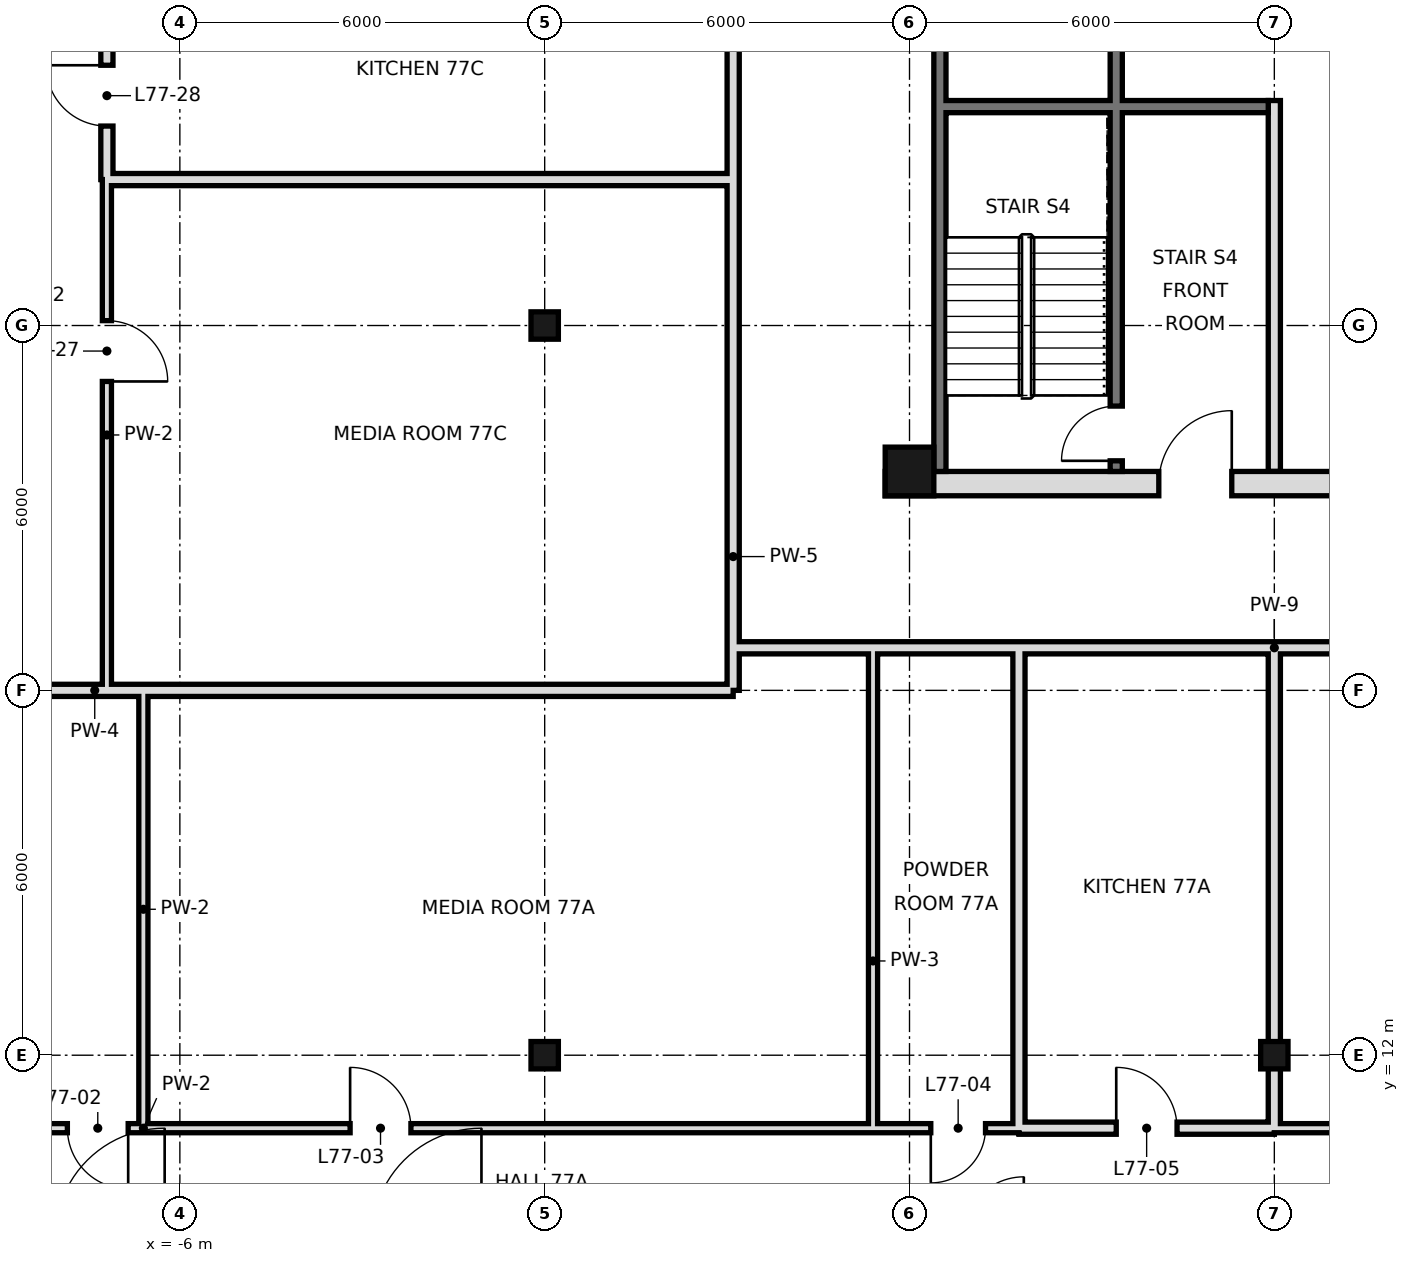
"""IFC4 building model, lengths in metres.
Left out: names, types, materials, properties, quantities, classifications, styles, units other than length and angle.
Written with IfcOpenShell. Run it as: python <this file> out.ifc"""

import sys

from ifc_helpers import new_model, si_unit, direction, frame, frame_2d, origin, origin_2d, place, context, subcontext, project, spatial, rectangle, hollow_rectangle, extrude, element, fill, save


model = new_model("IFC4")
c1 = context("Model", 3, precision=1e-05, world=origin(), true_north=direction((0.0, 1.0)))
c2 = subcontext(c1, "Body", "Model", "MODEL_VIEW")
j1 = project(units=[si_unit("LENGTHUNIT", "METRE"), si_unit("PLANEANGLEUNIT", "RADIAN")], contexts=[c1])
p1 = place(None, origin())
s1 = spatial("IfcSite", under=j1, at=p1, CompositionType="ELEMENT")
p2 = place(p1, origin())
s2 = spatial("IfcBuilding", under=s1, at=p2, CompositionType="ELEMENT")
p3 = place(p2, frame((0.0, 0.0, 323.2)))
s3 = spatial("IfcBuildingStorey", under=s2, at=p3, CompositionType="ELEMENT", Elevation=323.2)
for number, where, z_axis, x_axis in (
    (1, (0.0, 12.0, 0.0), (0.0, 0.0, 1.0), (1.0, 0.0, 0.0)),
    (2, (0.0, 24.0, 0.0), (0.0, 0.0, 1.0), (1.0, 0.0, 0.0)),
):
    element("IfcColumn", number, at=place(p3, frame(where, z_axis=z_axis, x_axis=x_axis)), inside=s3, PredefinedType="COLUMN", context=c2, shape_type="SweptSolid", body=[
        extrude(hollow_rectangle(XDim=0.45, YDim=0.45, WallThickness=0.022, at=origin_2d()), origin(), (0.0, 0.0, 1.0), 3.6),
    ])
p4 = place(p3, frame((6.0, 21.6, 0.0), z_axis=(0.0, 0.0, 1.0), x_axis=(1.0, 0.0, 0.0)))
e3 = element("IfcColumn", 3, at=p4, inside=s3, PredefinedType="COLUMN", context=c2, shape_type="SweptSolid", body=[
    extrude(hollow_rectangle(XDim=0.8, YDim=0.8, WallThickness=0.025, at=origin_2d()), origin(), (0.0, 0.0, 1.0), 3.6),
])
p5 = place(p3, frame((12.0, 12.0, 0.0), z_axis=(0.0, 0.0, 1.0), x_axis=(1.0, 0.0, 0.0)))
e4 = element("IfcColumn", 4, at=p5, inside=s3, PredefinedType="COLUMN", context=c2, shape_type="SweptSolid", body=[
    extrude(hollow_rectangle(XDim=0.45, YDim=0.45, WallThickness=0.022, at=origin_2d()), origin(), (0.0, 0.0, 1.0), 3.6),
])
p6 = place(p3, frame((-6.6, 10.8, 0.0), z_axis=(0.0, 0.0, 1.0), x_axis=(0.0, 1.0, 0.0)))
e5 = element("IfcWall", 5, at=p6, inside=s3, PredefinedType="PARTITIONING", context=c2, shape_type="SweptSolid", body=[
    extrude(rectangle(XDim=7.2, YDim=0.15, at=frame_2d((3.6, 0.0))), origin(), (0.0, 0.0, 1.0), 3.42),
])
p7 = place(p3, frame((-7.2, 26.4, 0.0), z_axis=(0.0, 0.0, 1.0), x_axis=(0.0, 1.0, 0.0)))
e6 = element("IfcWall", 6, at=p7, inside=s3, PredefinedType="SOLIDWALL", context=c2, shape_type="SweptSolid", body=[
    extrude(rectangle(XDim=3.6, YDim=0.2, at=frame_2d((1.8, 0.0))), origin(), (0.0, 0.0, 1.0), 2.72),
])
p8 = place(p7, frame((0.88, 0.0, 0.0)))
e7 = element("IfcOpeningElement", 7, at=p8, cuts=e6, PredefinedType="OPENING", context=c2, shape_type="SweptSolid", body=[
    extrude(rectangle(XDim=1.0, YDim=2.4, at=frame_2d((0.5, 1.2))), frame((0.0, 0.11, 0.0), z_axis=(0.0, -1.0, 0.0), x_axis=(1.0, 0.0, 0.0)), (0.0, 0.0, 1.0), 0.22),
])
p9 = place(p3, frame((-7.2, 18.0, 0.0), z_axis=(0.0, 0.0, 1.0), x_axis=(0.0, 1.0, 0.0)))
e8 = element("IfcWall", 8, at=p9, inside=s3, PredefinedType="PARTITIONING", context=c2, shape_type="SweptSolid", body=[
    extrude(rectangle(XDim=8.4, YDim=0.15, at=frame_2d((4.2, 0.0))), origin(), (0.0, 0.0, 1.0), 3.42),
])
p10 = place(p9, frame((5.08, 0.0, 0.0)))
e9 = element("IfcOpeningElement", 9, at=p10, cuts=e8, PredefinedType="OPENING", context=c2, shape_type="SweptSolid", body=[
    extrude(rectangle(XDim=1.0, YDim=2.4, at=frame_2d((0.5, 1.2))), frame((0.0, 0.085, 0.0), z_axis=(0.0, -1.0, 0.0), x_axis=(1.0, 0.0, 0.0)), (0.0, 0.0, 1.0), 0.17),
])
p11 = place(p3, frame((12.0, 10.8, 0.0), z_axis=(0.0, 0.0, 1.0), x_axis=(0.0, 1.0, 0.0)))
e10 = element("IfcWall", 10, at=p11, inside=s3, PredefinedType="SOLIDWALL", context=c2, shape_type="SweptSolid", body=[
    extrude(rectangle(XDim=7.9, YDim=0.2, at=frame_2d((3.95, 0.0))), origin(), (0.0, 0.0, 1.0), 2.72),
])
p12 = place(p3, frame((3.1, 18.7, 0.0), z_axis=(0.0, 0.0, 1.0), x_axis=(0.0, 1.0, 0.0)))
e11 = element("IfcWall", 11, at=p12, inside=s3, PredefinedType="SOLIDWALL", context=c2, shape_type="SweptSolid", body=[
    extrude(rectangle(XDim=7.7, YDim=0.2, at=frame_2d((3.85, 0.0))), origin(), (0.0, 0.0, 1.0), 3.42),
])
p13 = place(p3, frame((3.1, 26.4, 0.0), z_axis=(0.0, 0.0, 1.0), x_axis=(0.0, 1.0, 0.0)))
e12 = element("IfcWall", 12, at=p13, inside=s3, PredefinedType="SOLIDWALL", context=c2, shape_type="SweptSolid", body=[
    extrude(rectangle(XDim=3.6, YDim=0.2, at=frame_2d((1.8, 0.0))), origin(), (0.0, 0.0, 1.0), 2.97),
])
p14 = place(p3, frame((3.1, 18.0, 0.0), z_axis=(0.0, 0.0, 1.0), x_axis=(0.0, 1.0, 0.0)))
e13 = element("IfcWall", 13, at=p14, inside=s3, PredefinedType="SOLIDWALL", context=c2, shape_type="SweptSolid", body=[
    extrude(rectangle(XDim=0.7, YDim=0.2, at=frame_2d((0.35, 0.0))), origin(), (0.0, 0.0, 1.0), 2.97),
])
p15 = place(p3, frame((5.4, 10.8, 0.0), z_axis=(0.0, 0.0, 1.0), x_axis=(0.0, 1.0, 0.0)))
e14 = element("IfcWall", 14, at=p15, inside=s3, PredefinedType="PARTITIONING", context=c2, shape_type="SweptSolid", body=[
    extrude(rectangle(XDim=7.9, YDim=0.15, at=frame_2d((3.95, 0.0))), origin(), (0.0, 0.0, 1.0), 3.42),
])
p16 = place(p3, frame((7.8, 10.8, 0.0), z_axis=(0.0, 0.0, 1.0), x_axis=(0.0, 1.0, 0.0)))
e15 = element("IfcWall", 15, at=p16, inside=s3, PredefinedType="SOLIDWALL", context=c2, shape_type="SweptSolid", body=[
    extrude(rectangle(XDim=7.9, YDim=0.2, at=frame_2d((3.95, 0.0))), origin(), (0.0, 0.0, 1.0), 2.72),
])
p17 = place(p3, frame((7.8, 10.8, 0.0), z_axis=(0.0, 0.0, 1.0), x_axis=(1.0, 0.0, 0.0)))
e16 = element("IfcWall", 16, at=p17, inside=s3, PredefinedType="SOLIDWALL", context=c2, shape_type="SweptSolid", body=[
    extrude(rectangle(XDim=4.2, YDim=0.2, at=frame_2d((2.1, 0.0))), origin(), (0.0, 0.0, 1.0), 2.72),
])
p18 = place(p17, frame((1.6, 0.0, 0.0)))
e17 = element("IfcOpeningElement", 17, at=p18, cuts=e16, PredefinedType="OPENING", context=c2, shape_type="SweptSolid", body=[
    extrude(rectangle(XDim=1.0, YDim=2.4, at=frame_2d((0.5, 1.2))), frame((0.0, 0.11, 0.0), z_axis=(0.0, -1.0, 0.0), x_axis=(1.0, 0.0, 0.0)), (0.0, 0.0, 1.0), 0.22),
])
p19 = place(p3, frame((-18.6, 10.8, 0.0), z_axis=(0.0, 0.0, 1.0), x_axis=(1.0, 0.0, 0.0)))
e18 = element("IfcWall", 18, at=p19, inside=s3, PredefinedType="PARTITIONING", context=c2, shape_type="SweptSolid", body=[
    extrude(rectangle(XDim=24.0, YDim=0.15, at=frame_2d((12.0, 0.0))), origin(), (0.0, 0.0, 1.0), 3.42),
])
p20 = place(p19, frame((10.75, 0.0, 0.0)))
e19 = element("IfcOpeningElement", 19, at=p20, cuts=e18, PredefinedType="OPENING", context=c2, shape_type="SweptSolid", body=[
    extrude(rectangle(XDim=1.0, YDim=2.4, at=frame_2d((0.5, 1.2))), frame((0.0, 0.085, 0.0), z_axis=(0.0, -1.0, 0.0), x_axis=(1.0, 0.0, 0.0)), (0.0, 0.0, 1.0), 0.17),
])
p21 = place(p19, frame((15.4, 0.0, 0.0)))
e20 = element("IfcOpeningElement", 20, at=p21, cuts=e18, PredefinedType="OPENING", context=c2, shape_type="SweptSolid", body=[
    extrude(rectangle(XDim=1.0, YDim=2.4, at=frame_2d((0.5, 1.2))), frame((0.0, 0.085, 0.0), z_axis=(0.0, -1.0, 0.0), x_axis=(1.0, 0.0, 0.0)), (0.0, 0.0, 1.0), 0.17),
])
p22 = place(p3, frame((12.0, 10.8, 0.0), z_axis=(0.0, 0.0, 1.0), x_axis=(1.0, 0.0, 0.0)))
e21 = element("IfcWall", 21, at=p22, inside=s3, PredefinedType="PARTITIONING", context=c2, shape_type="SweptSolid", body=[
    extrude(rectangle(XDim=12.6, YDim=0.15, at=frame_2d((6.3, 0.0))), origin(), (0.0, 0.0, 1.0), 3.42),
])
p23 = place(p22, frame((2.5, 0.0, 0.0)))
e22 = element("IfcOpeningElement", 22, at=p23, cuts=e21, PredefinedType="OPENING", context=c2, shape_type="SweptSolid", body=[
    extrude(rectangle(XDim=1.0, YDim=2.4, at=frame_2d((0.5, 1.2))), frame((0.0, 0.085, 0.0), z_axis=(0.0, -1.0, 0.0), x_axis=(1.0, 0.0, 0.0)), (0.0, 0.0, 1.0), 0.17),
])
p24 = place(p22, frame((9.82, 0.0, 0.0)))
e23 = element("IfcOpeningElement", 23, at=p24, cuts=e21, PredefinedType="OPENING", context=c2, shape_type="SweptSolid", body=[
    extrude(rectangle(XDim=1.0, YDim=2.4, at=frame_2d((0.5, 1.2))), frame((0.0, 0.085, 0.0), z_axis=(0.0, -1.0, 0.0), x_axis=(1.0, 0.0, 0.0)), (0.0, 0.0, 1.0), 0.17),
])
p25 = place(p3, frame((5.4, 10.8, 0.0), z_axis=(0.0, 0.0, 1.0), x_axis=(1.0, 0.0, 0.0)))
e24 = element("IfcWall", 24, at=p25, inside=s3, PredefinedType="PARTITIONING", context=c2, shape_type="SweptSolid", body=[
    extrude(rectangle(XDim=2.4, YDim=0.15, at=frame_2d((1.2, 0.0))), origin(), (0.0, 0.0, 1.0), 3.42),
])
p26 = place(p25, frame((0.95, 0.0, 0.0)))
e25 = element("IfcOpeningElement", 25, at=p26, cuts=e24, PredefinedType="OPENING", context=c2, shape_type="SweptSolid", body=[
    extrude(rectangle(XDim=0.9, YDim=2.4, at=frame_2d((0.45, 1.2))), frame((0.0, 0.085, 0.0), z_axis=(0.0, -1.0, 0.0), x_axis=(1.0, 0.0, 0.0)), (0.0, 0.0, 1.0), 0.17),
])
p27 = place(p3, frame((-18.6, 18.0, 0.0), z_axis=(0.0, 0.0, 1.0), x_axis=(1.0, 0.0, 0.0)))
e26 = element("IfcWall", 26, at=p27, inside=s3, PredefinedType="SOLIDWALL", context=c2, shape_type="SweptSolid", body=[
    extrude(rectangle(XDim=21.7, YDim=0.2, at=frame_2d((10.85, 0.0))), origin(), (0.0, 0.0, 1.0), 2.72),
])
p28 = place(p3, frame((3.1, 18.7, 0.0), z_axis=(0.0, 0.0, 1.0), x_axis=(1.0, 0.0, 0.0)))
e27 = element("IfcWall", 27, at=p28, inside=s3, PredefinedType="SOLIDWALL", context=c2, shape_type="SweptSolid", body=[
    extrude(rectangle(XDim=4.7, YDim=0.2, at=frame_2d((2.35, 0.0))), origin(), (0.0, 0.0, 1.0), 2.72),
])
p29 = place(p3, frame((12.0, 18.7, 0.0), z_axis=(0.0, 0.0, 1.0), x_axis=(1.0, 0.0, 0.0)))
e28 = element("IfcWall", 28, at=p29, inside=s3, PredefinedType="SOLIDWALL", context=c2, shape_type="SweptSolid", body=[
    extrude(rectangle(XDim=15.0, YDim=0.2, at=frame_2d((7.5, 0.0))), origin(), (0.0, 0.0, 1.0), 2.72),
])
p30 = place(p29, frame((3.26, 0.0, 0.0)))
e29 = element("IfcOpeningElement", 29, at=p30, cuts=e28, PredefinedType="OPENING", context=c2, shape_type="SweptSolid", body=[
    extrude(rectangle(XDim=1.2, YDim=2.4, at=frame_2d((0.6, 1.2))), frame((0.0, 0.11, 0.0), z_axis=(0.0, -1.0, 0.0), x_axis=(1.0, 0.0, 0.0)), (0.0, 0.0, 1.0), 0.22),
])
p31 = place(p3, frame((7.8, 18.7, 0.0), z_axis=(0.0, 0.0, 1.0), x_axis=(1.0, 0.0, 0.0)))
e30 = element("IfcWall", 30, at=p31, inside=s3, PredefinedType="SOLIDWALL", context=c2, shape_type="SweptSolid", body=[
    extrude(rectangle(XDim=4.2, YDim=0.2, at=frame_2d((2.1, 0.0))), origin(), (0.0, 0.0, 1.0), 3.42),
])
p32 = place(p3, frame((-7.2, 26.4, 0.0), z_axis=(0.0, 0.0, 1.0), x_axis=(1.0, 0.0, 0.0)))
e31 = element("IfcWall", 31, at=p32, inside=s3, PredefinedType="SOLIDWALL", context=c2, shape_type="SweptSolid", body=[
    extrude(rectangle(XDim=10.3, YDim=0.2, at=frame_2d((5.15, 0.0))), origin(), (0.0, 0.0, 1.0), 2.72),
])
p33 = place(p3, frame((6.5, 21.6, 0.0), z_axis=(0.0, 0.0, 1.0), x_axis=(0.0, 1.0, 0.0)))
e32 = element("IfcWall", 32, at=p33, inside=s3, PredefinedType="SOLIDWALL", context=c2, shape_type="SweptSolid", body=[
    extrude(rectangle(XDim=23.5, YDim=0.2, at=frame_2d((11.75, 0.0))), origin(), (0.0, 0.0, 1.0), 3.42),
])
p34 = place(p3, frame((5.6, 21.4, 0.0), z_axis=(0.0, 0.0, 1.0), x_axis=(1.0, 0.0, 0.0)))
e33 = element("IfcWall", 33, at=p34, inside=s3, PredefinedType="SOLIDWALL", context=c2, shape_type="SweptSolid", body=[
    extrude(rectangle(XDim=36.8, YDim=0.4, at=frame_2d((18.4, 0.0))), origin(), (0.0, 0.0, 1.0), 3.42),
])
p35 = place(p34, frame((8.5, 0.0, 0.0)))
e34 = element("IfcOpeningElement", 34, at=p35, cuts=e33, PredefinedType="OPENING", context=c2, shape_type="SweptSolid", body=[
    extrude(rectangle(XDim=1.8, YDim=2.1, at=frame_2d((0.9, 1.05))), frame((0.0, 0.21, 0.0), z_axis=(0.0, -1.0, 0.0), x_axis=(1.0, 0.0, 0.0)), (0.0, 0.0, 1.0), 0.42),
])
p36 = place(p34, frame((17.5, 0.0, 0.0)))
e35 = element("IfcOpeningElement", 35, at=p36, cuts=e33, PredefinedType="OPENING", context=c2, shape_type="SweptSolid", body=[
    extrude(rectangle(XDim=1.8, YDim=2.1, at=frame_2d((0.9, 1.05))), frame((0.0, 0.21, 0.0), z_axis=(0.0, -1.0, 0.0), x_axis=(1.0, 0.0, 0.0)), (0.0, 0.0, 1.0), 0.42),
])
p37 = place(p34, frame((26.5, 0.0, 0.0)))
e36 = element("IfcOpeningElement", 36, at=p37, cuts=e33, PredefinedType="OPENING", context=c2, shape_type="SweptSolid", body=[
    extrude(rectangle(XDim=1.8, YDim=2.1, at=frame_2d((0.9, 1.05))), frame((0.0, 0.21, 0.0), z_axis=(0.0, -1.0, 0.0), x_axis=(1.0, 0.0, 0.0)), (0.0, 0.0, 1.0), 0.42),
])
p38 = place(p34, frame((4.5, 0.0, 0.0)))
e37 = element("IfcOpeningElement", 37, at=p38, cuts=e33, PredefinedType="OPENING", context=c2, shape_type="SweptSolid", body=[
    extrude(rectangle(XDim=1.2, YDim=2.1, at=frame_2d((0.6, 1.05))), frame((0.0, 0.21, 0.0), z_axis=(0.0, -1.0, 0.0), x_axis=(1.0, 0.0, 0.0)), (0.0, 0.0, 1.0), 0.42),
])
p39 = place(p34, frame((31.1, 0.0, 0.0)))
e38 = element("IfcOpeningElement", 38, at=p39, cuts=e33, PredefinedType="OPENING", context=c2, shape_type="SweptSolid", body=[
    extrude(rectangle(XDim=1.2, YDim=2.1, at=frame_2d((0.6, 1.05))), frame((0.0, 0.21, 0.0), z_axis=(0.0, -1.0, 0.0), x_axis=(1.0, 0.0, 0.0)), (0.0, 0.0, 1.0), 0.42),
])
p40 = place(p3, frame((12.0, 21.6, 0.0), z_axis=(0.0, 0.0, 1.0), x_axis=(0.0, 1.0, 0.0)))
e39 = element("IfcWall", 39, at=p40, inside=s3, PredefinedType="PARTITIONING", context=c2, shape_type="SweptSolid", body=[
    extrude(rectangle(XDim=6.1, YDim=0.2, at=frame_2d((3.05, 0.0))), origin(), (0.0, 0.0, 1.0), 3.42),
])
p41 = place(p3, frame((9.4, 21.6, 0.0), z_axis=(0.0, 0.0, 1.0), x_axis=(0.0, 1.0, 0.0)))
e40 = element("IfcWall", 40, at=p41, inside=s3, PredefinedType="SOLIDWALL", context=c2, shape_type="SweptSolid", body=[
    extrude(rectangle(XDim=23.4, YDim=0.2, at=frame_2d((11.7, 0.0))), origin(), (0.0, 0.0, 1.0), 3.42),
])
p42 = place(p41, frame((7.95, 0.0, 0.0)))
e41 = element("IfcOpeningElement", 41, at=p42, cuts=e40, PredefinedType="OPENING", context=c2, shape_type="SweptSolid", body=[
    extrude(rectangle(XDim=1.0, YDim=2.1, at=frame_2d((0.5, 1.05))), frame((0.0, 0.11, 0.0), z_axis=(0.0, -1.0, 0.0), x_axis=(1.0, 0.0, 0.0)), (0.0, 0.0, 1.0), 0.22),
])
p43 = place(p41, frame((12.6, 0.0, 0.0)))
e42 = element("IfcOpeningElement", 42, at=p43, cuts=e40, PredefinedType="OPENING", context=c2, shape_type="SweptSolid", body=[
    extrude(rectangle(XDim=1.0, YDim=2.1, at=frame_2d((0.5, 1.05))), frame((0.0, 0.11, 0.0), z_axis=(0.0, -1.0, 0.0), x_axis=(1.0, 0.0, 0.0)), (0.0, 0.0, 1.0), 0.22),
])
p44 = place(p41, frame((22.1, 0.0, 0.0)))
e43 = element("IfcOpeningElement", 43, at=p44, cuts=e40, PredefinedType="OPENING", context=c2, shape_type="SweptSolid", body=[
    extrude(rectangle(XDim=1.0, YDim=2.1, at=frame_2d((0.5, 1.05))), frame((0.0, 0.11, 0.0), z_axis=(0.0, -1.0, 0.0), x_axis=(1.0, 0.0, 0.0)), (0.0, 0.0, 1.0), 0.22),
])
p45 = place(p41, frame((0.175, 0.0, 0.0)))
e44 = element("IfcOpeningElement", 44, at=p45, cuts=e40, PredefinedType="OPENING", context=c2, shape_type="SweptSolid", body=[
    extrude(rectangle(XDim=0.9, YDim=2.1, at=frame_2d((0.45, 1.05))), frame((0.0, 0.11, 0.0), z_axis=(0.0, -1.0, 0.0), x_axis=(1.0, 0.0, 0.0)), (0.0, 0.0, 1.0), 0.22),
])
p46 = place(p3, frame((6.6, 27.6, 0.0), z_axis=(0.0, 0.0, 1.0), x_axis=(1.0, 0.0, 0.0)))
e45 = element("IfcWall", 45, at=p46, inside=s3, PredefinedType="SOLIDWALL", context=c2, shape_type="SweptSolid", body=[
    extrude(rectangle(XDim=5.3, YDim=0.2, at=frame_2d((2.65, 0.0))), origin(), (0.0, 0.0, 1.0), 3.42),
])
p47 = place(p20, origin())
e46 = element("IfcDoor", 46, at=p47, inside=s3, OperationType="SINGLE_SWING_RIGHT", PredefinedType="DOOR", context=c2, shape_type="SweptSolid", body=[
    extrude(rectangle(XDim=1.0, YDim=2.4, at=frame_2d((0.5, 1.2))), frame((0.0, 0.025, 0.0), z_axis=(0.0, -1.0, 0.0), x_axis=(1.0, 0.0, 0.0)), (0.0, 0.0, 1.0), 0.05),
])
fill(e19, e46)
p48 = place(p21, origin())
e47 = element("IfcDoor", 47, at=p48, inside=s3, OperationType="SINGLE_SWING_LEFT", PredefinedType="DOOR", context=c2, shape_type="SweptSolid", body=[
    extrude(rectangle(XDim=1.0, YDim=2.4, at=frame_2d((0.5, 1.2))), frame((0.0, 0.025, 0.0), z_axis=(0.0, -1.0, 0.0), x_axis=(1.0, 0.0, 0.0)), (0.0, 0.0, 1.0), 0.05),
])
fill(e20, e47)
p49 = place(p26, frame((0.9, 0.0, 0.0), z_axis=(0.0, 0.0, 1.0), x_axis=(-1.0, 0.0, 0.0)))
e48 = element("IfcDoor", 48, at=p49, inside=s3, OperationType="SINGLE_SWING_RIGHT", PredefinedType="DOOR", context=c2, shape_type="SweptSolid", body=[
    extrude(rectangle(XDim=0.9, YDim=2.4, at=frame_2d((0.45, 1.2))), frame((0.0, 0.025, 0.0), z_axis=(0.0, -1.0, 0.0), x_axis=(1.0, 0.0, 0.0)), (0.0, 0.0, 1.0), 0.05),
])
fill(e25, e48)
p50 = place(p18, origin())
e49 = element("IfcDoor", 49, at=p50, inside=s3, OperationType="SINGLE_SWING_LEFT", PredefinedType="DOOR", context=c2, shape_type="SweptSolid", body=[
    extrude(rectangle(XDim=1.0, YDim=2.4, at=frame_2d((0.5, 1.2))), frame((0.0, 0.025, 0.0), z_axis=(0.0, -1.0, 0.0), x_axis=(1.0, 0.0, 0.0)), (0.0, 0.0, 1.0), 0.05),
])
fill(e17, e49)
p51 = place(p10, frame((1.0, 0.0, 0.0), z_axis=(0.0, 0.0, 1.0), x_axis=(-1.0, 0.0, 0.0)))
e50 = element("IfcDoor", 50, at=p51, inside=s3, OperationType="SINGLE_SWING_RIGHT", PredefinedType="DOOR", context=c2, shape_type="SweptSolid", body=[
    extrude(rectangle(XDim=1.0, YDim=2.4, at=frame_2d((0.5, 1.2))), frame((0.0, 0.025, 0.0), z_axis=(0.0, -1.0, 0.0), x_axis=(1.0, 0.0, 0.0)), (0.0, 0.0, 1.0), 0.05),
])
fill(e9, e50)
p52 = place(p8, frame((1.0, 0.0, 0.0), z_axis=(0.0, 0.0, 1.0), x_axis=(-1.0, 0.0, 0.0)))
e51 = element("IfcDoor", 51, at=p52, inside=s3, OperationType="SINGLE_SWING_LEFT", PredefinedType="DOOR", context=c2, shape_type="SweptSolid", body=[
    extrude(rectangle(XDim=1.0, YDim=2.4, at=frame_2d((0.5, 1.2))), frame((0.0, 0.025, 0.0), z_axis=(0.0, -1.0, 0.0), x_axis=(1.0, 0.0, 0.0)), (0.0, 0.0, 1.0), 0.05),
])
fill(e7, e51)
p53 = place(p38, frame((1.2, 0.0, 0.0), z_axis=(0.0, 0.0, 1.0), x_axis=(-1.0, 0.0, 0.0)))
e52 = element("IfcDoor", 52, at=p53, inside=s3, OperationType="SINGLE_SWING_LEFT", PredefinedType="DOOR", context=c2, shape_type="SweptSolid", body=[
    extrude(rectangle(XDim=1.2, YDim=2.1, at=frame_2d((0.6, 1.05))), frame((0.0, 0.025, 0.0), z_axis=(0.0, -1.0, 0.0), x_axis=(1.0, 0.0, 0.0)), (0.0, 0.0, 1.0), 0.05),
])
fill(e37, e52)
p54 = place(p45, origin())
e53 = element("IfcDoor", 53, at=p54, inside=s3, OperationType="SINGLE_SWING_LEFT", PredefinedType="DOOR", context=c2, shape_type="SweptSolid", body=[
    extrude(rectangle(XDim=0.9, YDim=2.1, at=frame_2d((0.45, 1.05))), frame((0.0, 0.025, 0.0), z_axis=(0.0, -1.0, 0.0), x_axis=(1.0, 0.0, 0.0)), (0.0, 0.0, 1.0), 0.05),
])
fill(e44, e53)
save(model, sys.argv[1])
